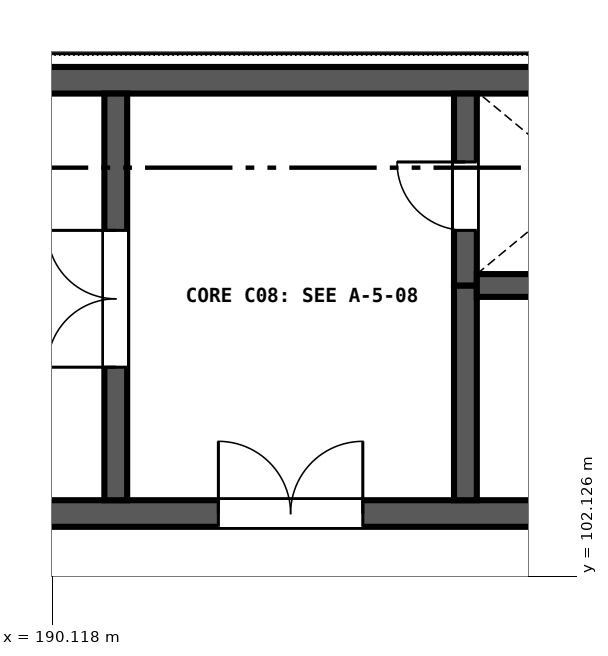
"""IFC4 building model, lengths in metres.
Left out: names, types, materials, properties, quantities, classifications, styles, units other than length and angle.
Written with IfcOpenShell. Run it as: python <this file> out.ifc"""

import sys

from ifc_helpers import new_model, si_unit, direction, frame, frame_2d, origin, place, context, subcontext, project, spatial, rectangle, extrude, element, fill, save


model = new_model("IFC4")
c1 = context("Model", 3, precision=1e-05, world=origin(), true_north=direction((0.0, 1.0)))
c2 = subcontext(c1, "Body", "Model", "MODEL_VIEW")
j1 = project(units=[si_unit("LENGTHUNIT", "METRE"), si_unit("PLANEANGLEUNIT", "RADIAN")], contexts=[c1])
p1 = place(None, origin())
s1 = spatial("IfcSite", under=j1, at=p1, CompositionType="ELEMENT")
p2 = place(p1, origin())
s2 = spatial("IfcBuilding", under=s1, at=p2, CompositionType="ELEMENT")
p3 = place(p2, frame((0.0, 0.0, 4.8)))
s3 = spatial("IfcBuildingStorey", under=s2, at=p3, CompositionType="ELEMENT", Elevation=4.8)
p4 = place(p3, frame((180.9, 102.95, 0.0), z_axis=(0.0, 0.0, 1.0), x_axis=(1.0, 0.0, 0.0)))
e1 = element("IfcWall", 1, at=p4, inside=s3, PredefinedType="SHEAR", context=c2, shape_type="SweptSolid", body=[
    extrude(rectangle(XDim=18.0, YDim=0.35, at=frame_2d((9.0, 0.0))), origin(), (0.0, 0.0, 1.0), 4.52),
])
p5 = place(p4, frame((11.4, 0.0, 0.0)))
e2 = element("IfcOpeningElement", 2, at=p5, cuts=e1, PredefinedType="OPENING", context=c2, shape_type="SweptSolid", body=[
    extrude(rectangle(XDim=1.9, YDim=2.25, at=frame_2d((0.95, 1.125))), frame((0.0, 0.185, 0.0), z_axis=(0.0, -1.0, 0.0), x_axis=(1.0, 0.0, 0.0)), (0.0, 0.0, 1.0), 0.37),
])
p6 = place(p3, frame((198.9, 108.65, 0.0), z_axis=(0.0, 0.0, 1.0), x_axis=(-1.0, 0.0, 0.0)))
e3 = element("IfcWall", 3, at=p6, inside=s3, PredefinedType="SHEAR", context=c2, shape_type="SweptSolid", body=[
    extrude(rectangle(XDim=18.0, YDim=0.35, at=frame_2d((9.0, 0.0))), origin(), (0.0, 0.0, 1.0), 4.52),
])
p7 = place(p3, frame((190.95, 103.125, 0.0), z_axis=(0.0, 0.0, 1.0), x_axis=(0.0, 1.0, 0.0)))
e4 = element("IfcWall", 4, at=p7, inside=s3, PredefinedType="SHEAR", context=c2, shape_type="SweptSolid", body=[
    extrude(rectangle(XDim=5.35, YDim=0.3, at=frame_2d((2.675, 0.0))), origin(), (0.0, 0.0, 1.0), 4.52),
])
p8 = place(p7, frame((1.75, 0.0, 0.0)))
e5 = element("IfcOpeningElement", 5, at=p8, cuts=e4, PredefinedType="OPENING", context=c2, shape_type="SweptSolid", body=[
    extrude(rectangle(XDim=1.8, YDim=2.25, at=frame_2d((0.9, 1.125))), frame((0.0, 0.16, 0.0), z_axis=(0.0, -1.0, 0.0), x_axis=(1.0, 0.0, 0.0)), (0.0, 0.0, 1.0), 0.32),
])
p9 = place(p3, frame((195.55, 103.125, 0.0), z_axis=(0.0, 0.0, 1.0), x_axis=(0.0, 1.0, 0.0)))
e6 = element("IfcWall", 6, at=p9, inside=s3, PredefinedType="SHEAR", context=c2, shape_type="SweptSolid", body=[
    extrude(rectangle(XDim=2.825, YDim=0.3, at=frame_2d((1.413, 0.0))), origin(), (0.0, 0.0, 1.0), 4.52),
])
p10 = place(p3, frame((195.55, 105.95, 0.0), z_axis=(0.0, 0.0, 1.0), x_axis=(0.0, 1.0, 0.0)))
e7 = element("IfcWall", 7, at=p10, inside=s3, PredefinedType="SHEAR", context=c2, shape_type="SweptSolid", body=[
    extrude(rectangle(XDim=2.525, YDim=0.3, at=frame_2d((1.263, 0.0))), origin(), (0.0, 0.0, 1.0), 4.52),
])
p11 = place(p10, frame((0.725, 0.0, 0.0)))
e8 = element("IfcOpeningElement", 8, at=p11, cuts=e7, PredefinedType="OPENING", context=c2, shape_type="SweptSolid", body=[
    extrude(rectangle(XDim=0.9, YDim=2.1, at=frame_2d((0.45, 1.05))), frame((0.0, 0.16, 0.0), z_axis=(0.0, -1.0, 0.0), x_axis=(1.0, 0.0, 0.0)), (0.0, 0.0, 1.0), 0.32),
])
p12 = place(p3, frame((195.7, 105.95, 0.0), z_axis=(0.0, 0.0, 1.0), x_axis=(1.0, 0.0, 0.0)))
e9 = element("IfcWall", 9, at=p12, inside=s3, PredefinedType="SHEAR", context=c2, shape_type="SweptSolid", body=[
    extrude(rectangle(XDim=2.875, YDim=0.3, at=frame_2d((1.438, 0.0))), origin(), (0.0, 0.0, 1.0), 4.52),
])
p13 = place(p8, origin())
e10 = element("IfcDoor", 10, at=p13, inside=s3, OperationType="DOUBLE_DOOR_SINGLE_SWING", PredefinedType="DOOR", context=c2, shape_type="SweptSolid", body=[
    extrude(rectangle(XDim=1.8, YDim=2.25, at=frame_2d((0.9, 1.125))), frame((0.0, 0.025, 0.0), z_axis=(0.0, -1.0, 0.0), x_axis=(1.0, 0.0, 0.0)), (0.0, 0.0, 1.0), 0.05),
])
fill(e5, e10)
p14 = place(p11, origin())
e11 = element("IfcDoor", 11, at=p14, inside=s3, OperationType="SINGLE_SWING_RIGHT", PredefinedType="DOOR", context=c2, shape_type="SweptSolid", body=[
    extrude(rectangle(XDim=0.9, YDim=2.1, at=frame_2d((0.45, 1.05))), frame((0.0, 0.025, 0.0), z_axis=(0.0, -1.0, 0.0), x_axis=(1.0, 0.0, 0.0)), (0.0, 0.0, 1.0), 0.05),
])
fill(e8, e11)
p15 = place(p5, origin())
e12 = element("IfcDoor", 12, at=p15, inside=s3, OperationType="DOUBLE_DOOR_SINGLE_SWING", PredefinedType="DOOR", context=c2, shape_type="SweptSolid", body=[
    extrude(rectangle(XDim=1.9, YDim=2.25, at=frame_2d((0.95, 1.125))), frame((0.0, 0.025, 0.0), z_axis=(0.0, -1.0, 0.0), x_axis=(1.0, 0.0, 0.0)), (0.0, 0.0, 1.0), 0.05),
])
fill(e2, e12)
save(model, sys.argv[1])
